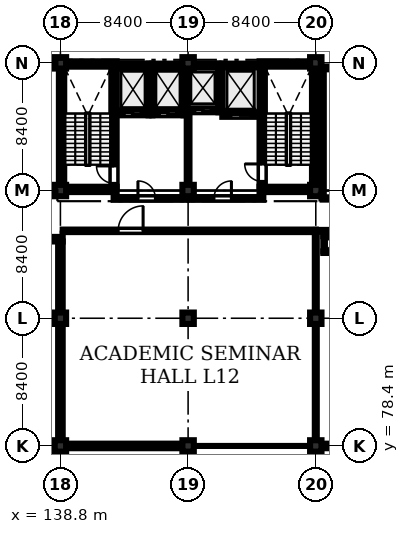
"""IFC4 building model, lengths in metres.
Left out: names, types, materials, properties, quantities, classifications, styles, units other than length and angle.
Written with IfcOpenShell. Run it as: python <this file> out.ifc"""

import sys

from ifc_helpers import new_model, si_unit, direction, frame, frame_2d, origin, origin_2d, place, context, subcontext, project, spatial, rectangle, extrude, element, fill, save


model = new_model("IFC4")
c1 = context("Model", 3, precision=1e-05, world=origin(), true_north=direction((0.0, 1.0)))
c2 = subcontext(c1, "Body", "Model", "MODEL_VIEW")
j1 = project(units=[si_unit("LENGTHUNIT", "METRE"), si_unit("PLANEANGLEUNIT", "RADIAN")], contexts=[c1])
p1 = place(None, origin())
s1 = spatial("IfcSite", under=j1, at=p1, CompositionType="ELEMENT")
p2 = place(p1, origin())
s2 = spatial("IfcBuilding", under=s1, at=p2, CompositionType="ELEMENT")
p3 = place(p2, frame((0.0, 0.0, 48.6)))
s3 = spatial("IfcBuildingStorey", under=s2, at=p3, CompositionType="ELEMENT", Elevation=48.6)
for number, where, z_axis, x_axis in (
    (1, (138.8, 78.4, 0.0), (0.0, 0.0, 1.0), (1.0, 0.0, 0.0)),
    (2, (138.8, 86.8, 0.0), (0.0, 0.0, 1.0), (1.0, 0.0, 0.0)),
    (3, (138.8, 95.2, 0.0), (0.0, 0.0, 1.0), (1.0, 0.0, 0.0)),
    (4, (138.8, 103.6, 0.0), (0.0, 0.0, 1.0), (1.0, 0.0, 0.0)),
    (5, (147.2, 78.4, 0.0), (0.0, 0.0, 1.0), (1.0, 0.0, 0.0)),
    (6, (147.2, 86.8, 0.0), (0.0, 0.0, 1.0), (1.0, 0.0, 0.0)),
    (7, (147.2, 95.2, 0.0), (0.0, 0.0, 1.0), (1.0, 0.0, 0.0)),
    (8, (147.2, 103.6, 0.0), (0.0, 0.0, 1.0), (1.0, 0.0, 0.0)),
    (9, (155.6, 78.4, 0.0), (0.0, 0.0, 1.0), (1.0, 0.0, 0.0)),
    (10, (155.6, 86.8, 0.0), (0.0, 0.0, 1.0), (1.0, 0.0, 0.0)),
    (11, (155.6, 95.2, 0.0), (0.0, 0.0, 1.0), (1.0, 0.0, 0.0)),
    (12, (155.6, 103.6, 0.0), (0.0, 0.0, 1.0), (1.0, 0.0, 0.0)),
):
    element("IfcColumn", number, at=place(p3, frame(where, z_axis=z_axis, x_axis=x_axis)), inside=s3, PredefinedType="COLUMN", context=c2, shape_type="SweptSolid", body=[
        extrude(rectangle(XDim=0.75, YDim=0.75, at=origin_2d()), origin(), (0.0, 0.0, 1.0), 4.03),
    ])
for number, where, z_axis, x_axis in (
    (13, (138.7, 95.275, 0.0), (0.0, 0.0, 1.0), (1.0, 0.0, 0.0)),
    (14, (138.7, 103.525, 0.0), (0.0, 0.0, 1.0), (1.0, 0.0, 0.0)),
):
    element("IfcWall", number, at=place(p3, frame(where, z_axis=z_axis, x_axis=x_axis)), inside=s3, PredefinedType="SHEAR", context=c2, shape_type="SweptSolid", body=[
        extrude(rectangle(XDim=3.8, YDim=0.35, at=frame_2d((1.9, 0.0))), origin(), (0.0, 0.0, 1.0), 4.03),
    ])
p4 = place(p3, frame((138.875, 95.45, 0.0), z_axis=(0.0, 0.0, 1.0), x_axis=(0.0, 1.0, 0.0)))
e15 = element("IfcWall", 15, at=p4, inside=s3, PredefinedType="SHEAR", context=c2, shape_type="SweptSolid", body=[
    extrude(rectangle(XDim=7.9, YDim=0.35, at=frame_2d((3.95, 0.0))), origin(), (0.0, 0.0, 1.0), 4.03),
])
p5 = place(p3, frame((142.325, 95.45, 0.0), z_axis=(0.0, 0.0, 1.0), x_axis=(0.0, 1.0, 0.0)))
e16 = element("IfcWall", 16, at=p5, inside=s3, PredefinedType="SHEAR", context=c2, shape_type="SweptSolid", body=[
    extrude(rectangle(XDim=7.9, YDim=0.35, at=frame_2d((3.95, 0.0))), origin(), (0.0, 0.0, 1.0), 4.03),
])
p6 = place(p5, frame((0.22, 0.0, 0.0)))
e17 = element("IfcOpeningElement", 17, at=p6, cuts=e16, PredefinedType="OPENING", context=c2, shape_type="SweptSolid", body=[
    extrude(rectangle(XDim=1.15, YDim=2.15, at=frame_2d((0.575, 1.075))), frame((0.0, 0.185, 0.0), z_axis=(0.0, -1.0, 0.0), x_axis=(1.0, 0.0, 0.0)), (0.0, 0.0, 1.0), 0.37),
])
for number, where, z_axis, x_axis in (
    (18, (151.9, 95.275, 0.0), (0.0, 0.0, 1.0), (1.0, 0.0, 0.0)),
    (19, (151.9, 103.525, 0.0), (0.0, 0.0, 1.0), (1.0, 0.0, 0.0)),
):
    element("IfcWall", number, at=place(p3, frame(where, z_axis=z_axis, x_axis=x_axis)), inside=s3, PredefinedType="SHEAR", context=c2, shape_type="SweptSolid", body=[
        extrude(rectangle(XDim=3.8, YDim=0.35, at=frame_2d((1.9, 0.0))), origin(), (0.0, 0.0, 1.0), 4.03),
    ])
p7 = place(p3, frame((152.075, 95.45, 0.0), z_axis=(0.0, 0.0, 1.0), x_axis=(0.0, 1.0, 0.0)))
e20 = element("IfcWall", 20, at=p7, inside=s3, PredefinedType="SHEAR", context=c2, shape_type="SweptSolid", body=[
    extrude(rectangle(XDim=7.9, YDim=0.35, at=frame_2d((3.95, 0.0))), origin(), (0.0, 0.0, 1.0), 4.03),
])
p8 = place(p7, frame((0.35, 0.0, 0.0)))
e21 = element("IfcOpeningElement", 21, at=p8, cuts=e20, PredefinedType="OPENING", context=c2, shape_type="SweptSolid", body=[
    extrude(rectangle(XDim=1.15, YDim=2.15, at=frame_2d((0.575, 1.075))), frame((0.0, 0.185, 0.0), z_axis=(0.0, -1.0, 0.0), x_axis=(1.0, 0.0, 0.0)), (0.0, 0.0, 1.0), 0.37),
])
p9 = place(p3, frame((155.525, 95.45, 0.0), z_axis=(0.0, 0.0, 1.0), x_axis=(0.0, 1.0, 0.0)))
e22 = element("IfcWall", 22, at=p9, inside=s3, PredefinedType="SHEAR", context=c2, shape_type="SweptSolid", body=[
    extrude(rectangle(XDim=7.9, YDim=0.35, at=frame_2d((3.95, 0.0))), origin(), (0.0, 0.0, 1.0), 4.03),
])
p10 = place(p3, frame((142.5, 100.275, 0.0), z_axis=(0.0, 0.0, 1.0), x_axis=(1.0, 0.0, 0.0)))
e23 = element("IfcWall", 23, at=p10, inside=s3, PredefinedType="SHEAR", context=c2, shape_type="SweptSolid", body=[
    extrude(rectangle(XDim=2.1, YDim=0.25, at=frame_2d((1.05, 0.0))), origin(), (0.0, 0.0, 1.0), 4.03),
])
p11 = place(p10, frame((0.5, 0.0, 0.0)))
e24 = element("IfcOpeningElement", 24, at=p11, cuts=e23, PredefinedType="OPENING", context=c2, shape_type="SweptSolid", body=[
    extrude(rectangle(XDim=1.1, YDim=2.15, at=frame_2d((0.55, 1.075))), frame((0.0, 0.135, 0.0), z_axis=(0.0, -1.0, 0.0), x_axis=(1.0, 0.0, 0.0)), (0.0, 0.0, 1.0), 0.27),
])
p12 = place(p3, frame((142.5, 103.425, 0.0), z_axis=(0.0, 0.0, 1.0), x_axis=(1.0, 0.0, 0.0)))
e25 = element("IfcWall", 25, at=p12, inside=s3, PredefinedType="SHEAR", context=c2, shape_type="SweptSolid", body=[
    extrude(rectangle(XDim=2.1, YDim=0.25, at=frame_2d((1.05, 0.0))), origin(), (0.0, 0.0, 1.0), 4.03),
])
p13 = place(p3, frame((144.725, 100.15, 0.0), z_axis=(0.0, 0.0, 1.0), x_axis=(0.0, 1.0, 0.0)))
e26 = element("IfcWall", 26, at=p13, inside=s3, PredefinedType="SHEAR", context=c2, shape_type="SweptSolid", body=[
    extrude(rectangle(XDim=3.4, YDim=0.25, at=frame_2d((1.7, 0.0))), origin(), (0.0, 0.0, 1.0), 4.03),
])
p14 = place(p3, frame((144.85, 100.275, 0.0), z_axis=(0.0, 0.0, 1.0), x_axis=(1.0, 0.0, 0.0)))
e27 = element("IfcWall", 27, at=p14, inside=s3, PredefinedType="SHEAR", context=c2, shape_type="SweptSolid", body=[
    extrude(rectangle(XDim=2.05, YDim=0.25, at=frame_2d((1.025, 0.0))), origin(), (0.0, 0.0, 1.0), 4.03),
])
p15 = place(p14, frame((0.465, 0.0, 0.0)))
e28 = element("IfcOpeningElement", 28, at=p15, cuts=e27, PredefinedType="OPENING", context=c2, shape_type="SweptSolid", body=[
    extrude(rectangle(XDim=1.12, YDim=2.15, at=frame_2d((0.56, 1.075))), frame((0.0, 0.135, 0.0), z_axis=(0.0, -1.0, 0.0), x_axis=(1.0, 0.0, 0.0)), (0.0, 0.0, 1.0), 0.27),
])
p16 = place(p3, frame((144.85, 103.425, 0.0), z_axis=(0.0, 0.0, 1.0), x_axis=(1.0, 0.0, 0.0)))
e29 = element("IfcWall", 29, at=p16, inside=s3, PredefinedType="SHEAR", context=c2, shape_type="SweptSolid", body=[
    extrude(rectangle(XDim=2.05, YDim=0.25, at=frame_2d((1.025, 0.0))), origin(), (0.0, 0.0, 1.0), 4.03),
])
p17 = place(p3, frame((147.025, 100.15, 0.0), z_axis=(0.0, 0.0, 1.0), x_axis=(0.0, 1.0, 0.0)))
e30 = element("IfcWall", 30, at=p17, inside=s3, PredefinedType="SHEAR", context=c2, shape_type="SweptSolid", body=[
    extrude(rectangle(XDim=3.4, YDim=0.25, at=frame_2d((1.7, 0.0))), origin(), (0.0, 0.0, 1.0), 4.03),
])
p18 = place(p3, frame((147.15, 100.475, 0.0), z_axis=(0.0, 0.0, 1.0), x_axis=(1.0, 0.0, 0.0)))
e31 = element("IfcWall", 31, at=p18, inside=s3, PredefinedType="SHEAR", context=c2, shape_type="SweptSolid", body=[
    extrude(rectangle(XDim=2.05, YDim=0.25, at=frame_2d((1.025, 0.0))), origin(), (0.0, 0.0, 1.0), 4.03),
])
p19 = place(p18, frame((0.495, 0.0, 0.0)))
e32 = element("IfcOpeningElement", 32, at=p19, cuts=e31, PredefinedType="OPENING", context=c2, shape_type="SweptSolid", body=[
    extrude(rectangle(XDim=1.06, YDim=2.15, at=frame_2d((0.53, 1.075))), frame((0.0, 0.135, 0.0), z_axis=(0.0, -1.0, 0.0), x_axis=(1.0, 0.0, 0.0)), (0.0, 0.0, 1.0), 0.27),
])
p20 = place(p3, frame((147.15, 103.425, 0.0), z_axis=(0.0, 0.0, 1.0), x_axis=(1.0, 0.0, 0.0)))
e33 = element("IfcWall", 33, at=p20, inside=s3, PredefinedType="SHEAR", context=c2, shape_type="SweptSolid", body=[
    extrude(rectangle(XDim=2.05, YDim=0.25, at=frame_2d((1.025, 0.0))), origin(), (0.0, 0.0, 1.0), 4.03),
])
p21 = place(p3, frame((149.325, 100.35, 0.0), z_axis=(0.0, 0.0, 1.0), x_axis=(0.0, 1.0, 0.0)))
e34 = element("IfcWall", 34, at=p21, inside=s3, PredefinedType="SHEAR", context=c2, shape_type="SweptSolid", body=[
    extrude(rectangle(XDim=3.2, YDim=0.25, at=frame_2d((1.6, 0.0))), origin(), (0.0, 0.0, 1.0), 4.03),
])
p22 = place(p3, frame((149.45, 100.175, 0.0), z_axis=(0.0, 0.0, 1.0), x_axis=(1.0, 0.0, 0.0)))
e35 = element("IfcWall", 35, at=p22, inside=s3, PredefinedType="SHEAR", context=c2, shape_type="SweptSolid", body=[
    extrude(rectangle(XDim=2.45, YDim=0.25, at=frame_2d((1.225, 0.0))), origin(), (0.0, 0.0, 1.0), 4.03),
])
p23 = place(p22, frame((0.575, 0.0, 0.0)))
e36 = element("IfcOpeningElement", 36, at=p23, cuts=e35, PredefinedType="OPENING", context=c2, shape_type="SweptSolid", body=[
    extrude(rectangle(XDim=1.3, YDim=2.25, at=frame_2d((0.65, 1.125))), frame((0.0, 0.135, 0.0), z_axis=(0.0, -1.0, 0.0), x_axis=(1.0, 0.0, 0.0)), (0.0, 0.0, 1.0), 0.27),
])
p24 = place(p3, frame((149.45, 103.425, 0.0), z_axis=(0.0, 0.0, 1.0), x_axis=(1.0, 0.0, 0.0)))
e37 = element("IfcWall", 37, at=p24, inside=s3, PredefinedType="SHEAR", context=c2, shape_type="SweptSolid", body=[
    extrude(rectangle(XDim=2.45, YDim=0.25, at=frame_2d((1.225, 0.0))), origin(), (0.0, 0.0, 1.0), 4.03),
])
p25 = place(p3, frame((146.825, 78.4, 0.0), z_axis=(0.0, 0.0, 1.0), x_axis=(-1.0, 0.0, 0.0)))
e38 = element("IfcWall", 38, at=p25, inside=s3, PredefinedType="STANDARD", context=c2, shape_type="SweptSolid", body=[
    extrude(rectangle(XDim=7.65, YDim=0.3, at=frame_2d((3.825, 0.0))), origin(), (0.0, 0.0, 1.0), 3.33),
])
p26 = place(p25, frame((1.15, 0.0, 0.95)))
e39 = element("IfcOpeningElement", 39, at=p26, cuts=e38, PredefinedType="OPENING", context=c2, shape_type="SweptSolid", body=[
    extrude(rectangle(XDim=2.2, YDim=2.0, at=frame_2d((1.1, 1.0))), frame((0.0, 0.16, 0.0), z_axis=(0.0, -1.0, 0.0), x_axis=(1.0, 0.0, 0.0)), (0.0, 0.0, 1.0), 0.32),
])
p27 = place(p3, frame((163.075, 78.4, 0.0), z_axis=(0.0, 0.0, 1.0), x_axis=(-1.0, 0.0, 0.0)))
e40 = element("IfcWall", 40, at=p27, inside=s3, PredefinedType="STANDARD", context=c2, shape_type="SweptSolid", body=[
    extrude(rectangle(XDim=7.1, YDim=0.3, at=frame_2d((3.55, 0.0))), origin(), (0.0, 0.0, 1.0), 3.33),
])
p28 = place(p27, frame((1.15, 0.0, 0.95)))
e41 = element("IfcOpeningElement", 41, at=p28, cuts=e40, PredefinedType="OPENING", context=c2, shape_type="SweptSolid", body=[
    extrude(rectangle(XDim=2.2, YDim=2.0, at=frame_2d((1.1, 1.0))), frame((0.0, 0.16, 0.0), z_axis=(0.0, -1.0, 0.0), x_axis=(1.0, 0.0, 0.0)), (0.0, 0.0, 1.0), 0.32),
])
p29 = place(p3, frame((138.8, 78.775, 0.0), z_axis=(0.0, 0.0, 1.0), x_axis=(0.0, 1.0, 0.0)))
e42 = element("IfcWall", 42, at=p29, inside=s3, PredefinedType="STANDARD", context=c2, shape_type="SweptSolid", body=[
    extrude(rectangle(XDim=7.65, YDim=0.3, at=frame_2d((3.825, 0.0))), origin(), (0.0, 0.0, 1.0), 3.33),
])
p30 = place(p29, frame((2.4, 0.0, 0.95)))
e43 = element("IfcOpeningElement", 43, at=p30, cuts=e42, PredefinedType="OPENING", context=c2, shape_type="SweptSolid", body=[
    extrude(rectangle(XDim=1.5, YDim=1.8, at=frame_2d((0.75, 0.9))), frame((0.0, 0.16, 0.0), z_axis=(0.0, -1.0, 0.0), x_axis=(1.0, 0.0, 0.0)), (0.0, 0.0, 1.0), 0.32),
])
p31 = place(p3, frame((138.8, 87.175, 0.0), z_axis=(0.0, 0.0, 1.0), x_axis=(0.0, 1.0, 0.0)))
e44 = element("IfcWall", 44, at=p31, inside=s3, PredefinedType="STANDARD", context=c2, shape_type="SweptSolid", body=[
    extrude(rectangle(XDim=4.675, YDim=0.3, at=frame_2d((2.337, 0.0))), origin(), (0.0, 0.0, 1.0), 3.33),
])
p32 = place(p31, frame((2.4, 0.0, 0.95)))
e45 = element("IfcOpeningElement", 45, at=p32, cuts=e44, PredefinedType="OPENING", context=c2, shape_type="SweptSolid", body=[
    extrude(rectangle(XDim=1.5, YDim=1.8, at=frame_2d((0.75, 0.9))), frame((0.0, 0.16, 0.0), z_axis=(0.0, -1.0, 0.0), x_axis=(1.0, 0.0, 0.0)), (0.0, 0.0, 1.0), 0.32),
])
p33 = place(p3, frame((138.95, 92.0, 0.0), z_axis=(0.0, 0.0, 1.0), x_axis=(-1.0, 0.0, 0.0)))
e46 = element("IfcWall", 46, at=p33, inside=s3, PredefinedType="STANDARD", context=c2, shape_type="SweptSolid", body=[
    extrude(rectangle(XDim=8.7, YDim=0.3, at=frame_2d((4.35, 0.0))), origin(), (0.0, 0.0, 1.0), 4.03),
])
p34 = place(p3, frame((142.3, 94.68, 0.0), z_axis=(0.0, 0.0, 1.0), x_axis=(1.0, 0.0, 0.0)))
e47 = element("IfcWall", 47, at=p34, inside=s3, PredefinedType="STANDARD", context=c2, shape_type="SweptSolid", body=[
    extrude(rectangle(XDim=4.8, YDim=0.18, at=frame_2d((2.4, 0.0))), origin(), (0.0, 0.0, 1.0), 4.03),
])
p35 = place(p34, frame((1.6, 0.0, 0.0)))
e48 = element("IfcOpeningElement", 48, at=p35, cuts=e47, PredefinedType="OPENING", context=c2, shape_type="SweptSolid", body=[
    extrude(rectangle(XDim=1.15, YDim=2.15, at=frame_2d((0.575, 1.075))), frame((0.0, 0.1, 0.0), z_axis=(0.0, -1.0, 0.0), x_axis=(1.0, 0.0, 0.0)), (0.0, 0.0, 1.0), 0.2),
])
p36 = place(p3, frame((147.3, 94.68, 0.0), z_axis=(0.0, 0.0, 1.0), x_axis=(1.0, 0.0, 0.0)))
e49 = element("IfcWall", 49, at=p36, inside=s3, PredefinedType="STANDARD", context=c2, shape_type="SweptSolid", body=[
    extrude(rectangle(XDim=4.85, YDim=0.18, at=frame_2d((2.425, 0.0))), origin(), (0.0, 0.0, 1.0), 4.03),
])
p37 = place(p36, frame((1.6, 0.0, 0.0)))
e50 = element("IfcOpeningElement", 50, at=p37, cuts=e49, PredefinedType="OPENING", context=c2, shape_type="SweptSolid", body=[
    extrude(rectangle(XDim=1.15, YDim=2.15, at=frame_2d((0.575, 1.075))), frame((0.0, 0.1, 0.0), z_axis=(0.0, -1.0, 0.0), x_axis=(1.0, 0.0, 0.0)), (0.0, 0.0, 1.0), 0.2),
])
p38 = place(p3, frame((147.2, 95.75, 0.0), z_axis=(0.0, 0.0, 1.0), x_axis=(0.0, 1.0, 0.0)))
e51 = element("IfcWall", 51, at=p38, inside=s3, PredefinedType="STANDARD", context=c2, shape_type="SweptSolid", body=[
    extrude(rectangle(XDim=4.5, YDim=0.18, at=frame_2d((2.25, 0.0))), origin(), (0.0, 0.0, 1.0), 3.33),
])
p39 = place(p3, frame((156.05, 94.68, 0.0), z_axis=(0.0, 0.0, 1.0), x_axis=(1.0, 0.0, 0.0)))
e52 = element("IfcWall", 52, at=p39, inside=s3, PredefinedType="PARTITIONING", context=c2, shape_type="SweptSolid", body=[
    extrude(rectangle(XDim=7.15, YDim=0.15, at=frame_2d((3.575, 0.0))), origin(), (0.0, 0.0, 1.0), 4.03),
])
p40 = place(p39, frame((0.55, 0.0, 0.0)))
e53 = element("IfcOpeningElement", 53, at=p40, cuts=e52, PredefinedType="OPENING", context=c2, shape_type="SweptSolid", body=[
    extrude(rectangle(XDim=0.98, YDim=2.12, at=frame_2d((0.49, 1.06))), frame((0.0, 0.085, 0.0), z_axis=(0.0, -1.0, 0.0), x_axis=(1.0, 0.0, 0.0)), (0.0, 0.0, 1.0), 0.17),
])
p41 = place(p3, frame((156.05, 103.25, 0.0), z_axis=(0.0, 0.0, 1.0), x_axis=(1.0, 0.0, 0.0)))
e54 = element("IfcWall", 54, at=p41, inside=s3, PredefinedType="PARTITIONING", context=c2, shape_type="SweptSolid", body=[
    extrude(rectangle(XDim=7.15, YDim=0.15, at=frame_2d((3.575, 0.0))), origin(), (0.0, 0.0, 1.0), 4.03),
])
p42 = place(p3, frame((156.05, 94.68, 0.0), z_axis=(0.0, 0.0, 1.0), x_axis=(0.0, 1.0, 0.0)))
e55 = element("IfcWall", 55, at=p42, inside=s3, PredefinedType="PARTITIONING", context=c2, shape_type="SweptSolid", body=[
    extrude(rectangle(XDim=8.57, YDim=0.15, at=frame_2d((4.285, 0.0))), origin(), (0.0, 0.0, 1.0), 4.03),
])
p43 = place(p3, frame((138.95, 92.55, 0.0), z_axis=(0.0, 0.0, 1.0), x_axis=(1.0, 0.0, 0.0)))
e56 = element("IfcWall", 56, at=p43, inside=s3, PredefinedType="PARTITIONING", context=c2, shape_type="SweptSolid", body=[
    extrude(rectangle(XDim=16.65, YDim=0.165, at=frame_2d((8.325, 0.0))), origin(), (0.0, 0.0, 1.0), 4.03),
])
p44 = place(p43, frame((3.65, 0.0, 0.0)))
e57 = element("IfcOpeningElement", 57, at=p44, cuts=e56, PredefinedType="OPENING", context=c2, shape_type="SweptSolid", body=[
    extrude(rectangle(XDim=1.64, YDim=2.24, at=frame_2d((0.82, 1.12))), frame((0.0, 0.093, 0.0), z_axis=(0.0, -1.0, 0.0), x_axis=(1.0, 0.0, 0.0)), (0.0, 0.0, 1.0), 0.185),
])
p45 = place(p3, frame((155.6, 92.55, 0.0), z_axis=(0.0, 0.0, 1.0), x_axis=(1.0, 0.0, 0.0)))
e58 = element("IfcWall", 58, at=p45, inside=s3, PredefinedType="PARTITIONING", context=c2, shape_type="SweptSolid", body=[
    extrude(rectangle(XDim=7.75, YDim=0.12, at=frame_2d((3.875, 0.0))), origin(), (0.0, 0.0, 1.0), 4.03),
])
p46 = place(p45, frame((3.4, 0.0, 0.0)))
e59 = element("IfcOpeningElement", 59, at=p46, cuts=e58, PredefinedType="OPENING", context=c2, shape_type="SweptSolid", body=[
    extrude(rectangle(XDim=1.08, YDim=2.15, at=frame_2d((0.54, 1.075))), frame((0.0, 0.07, 0.0), z_axis=(0.0, -1.0, 0.0), x_axis=(1.0, 0.0, 0.0)), (0.0, 0.0, 1.0), 0.14),
])
p47 = place(p3, frame((155.6, 78.55, 0.0), z_axis=(0.0, 0.0, 1.0), x_axis=(0.0, 1.0, 0.0)))
e60 = element("IfcWall", 60, at=p47, inside=s3, PredefinedType="PARTITIONING", context=c2, shape_type="SweptSolid", body=[
    extrude(rectangle(XDim=14.0, YDim=0.128, at=frame_2d((7.0, 0.0))), origin(), (0.0, 0.0, 1.0), 3.33),
])
for number, where, z_axis, x_axis in (
    (61, (156.095, 91.147, 0.0), (0.0, 0.0, 1.0), (1.0, 0.0, 0.0)),
    (62, (156.095, 92.252, 0.0), (0.0, 0.0, 1.0), (1.0, 0.0, 0.0)),
):
    element("IfcWall", number, at=place(p3, frame(where, z_axis=z_axis, x_axis=x_axis)), inside=s3, PredefinedType="PARTITIONING", context=c2, shape_type="SweptSolid", body=[
        extrude(rectangle(XDim=1.31, YDim=0.105, at=frame_2d((0.655, 0.0))), origin(), (0.0, 0.0, 1.0), 4.03),
    ])
p48 = place(p3, frame((156.147, 91.2, 0.0), z_axis=(0.0, 0.0, 1.0), x_axis=(0.0, 1.0, 0.0)))
e63 = element("IfcWall", 63, at=p48, inside=s3, PredefinedType="PARTITIONING", context=c2, shape_type="SweptSolid", body=[
    extrude(rectangle(XDim=1.0, YDim=0.105, at=frame_2d((0.5, 0.0))), origin(), (0.0, 0.0, 1.0), 4.03),
])
p49 = place(p26, origin())
e64 = element("IfcWindow", 64, at=p49, inside=s3, PartitioningType="DOUBLE_PANEL_VERTICAL", PredefinedType="WINDOW", context=c2, shape_type="SweptSolid", body=[
    extrude(rectangle(XDim=2.2, YDim=2.0, at=frame_2d((1.1, 1.0))), frame((0.0, 0.03, 0.0), z_axis=(0.0, -1.0, 0.0), x_axis=(1.0, 0.0, 0.0)), (0.0, 0.0, 1.0), 0.06),
])
fill(e39, e64)
p50 = place(p30, origin())
e65 = element("IfcWindow", 65, at=p50, inside=s3, PartitioningType="DOUBLE_PANEL_VERTICAL", PredefinedType="WINDOW", context=c2, shape_type="SweptSolid", body=[
    extrude(rectangle(XDim=1.5, YDim=1.8, at=frame_2d((0.75, 0.9))), frame((0.0, 0.03, 0.0), z_axis=(0.0, -1.0, 0.0), x_axis=(1.0, 0.0, 0.0)), (0.0, 0.0, 1.0), 0.06),
])
fill(e43, e65)
p51 = place(p32, origin())
e66 = element("IfcWindow", 66, at=p51, inside=s3, PartitioningType="DOUBLE_PANEL_VERTICAL", PredefinedType="WINDOW", context=c2, shape_type="SweptSolid", body=[
    extrude(rectangle(XDim=1.5, YDim=1.8, at=frame_2d((0.75, 0.9))), frame((0.0, 0.03, 0.0), z_axis=(0.0, -1.0, 0.0), x_axis=(1.0, 0.0, 0.0)), (0.0, 0.0, 1.0), 0.06),
])
fill(e45, e66)
p52 = place(p35, origin())
e67 = element("IfcDoor", 67, at=p52, inside=s3, OperationType="SINGLE_SWING_LEFT", PredefinedType="DOOR", context=c2, shape_type="SweptSolid", body=[
    extrude(rectangle(XDim=1.15, YDim=2.15, at=frame_2d((0.575, 1.075))), frame((0.0, 0.025, 0.0), z_axis=(0.0, -1.0, 0.0), x_axis=(1.0, 0.0, 0.0)), (0.0, 0.0, 1.0), 0.05),
])
fill(e48, e67)
p53 = place(p37, origin())
e68 = element("IfcDoor", 68, at=p53, inside=s3, OperationType="SINGLE_SWING_RIGHT", PredefinedType="DOOR", context=c2, shape_type="SweptSolid", body=[
    extrude(rectangle(XDim=1.15, YDim=2.15, at=frame_2d((0.575, 1.075))), frame((0.0, 0.025, 0.0), z_axis=(0.0, -1.0, 0.0), x_axis=(1.0, 0.0, 0.0)), (0.0, 0.0, 1.0), 0.05),
])
fill(e50, e68)
p54 = place(p44, origin())
e69 = element("IfcDoor", 69, at=p54, inside=s3, OperationType="SINGLE_SWING_RIGHT", PredefinedType="DOOR", context=c2, shape_type="SweptSolid", body=[
    extrude(rectangle(XDim=1.64, YDim=2.24, at=frame_2d((0.82, 1.12))), frame((0.0, 0.025, 0.0), z_axis=(0.0, -1.0, 0.0), x_axis=(1.0, 0.0, 0.0)), (0.0, 0.0, 1.0), 0.05),
])
fill(e57, e69)
p55 = place(p6, origin())
e70 = element("IfcDoor", 70, at=p55, inside=s3, OperationType="SINGLE_SWING_RIGHT", PredefinedType="DOOR", context=c2, shape_type="SweptSolid", body=[
    extrude(rectangle(XDim=1.15, YDim=2.15, at=frame_2d((0.575, 1.075))), frame((0.0, 0.025, 0.0), z_axis=(0.0, -1.0, 0.0), x_axis=(1.0, 0.0, 0.0)), (0.0, 0.0, 1.0), 0.05),
])
fill(e17, e70)
p56 = place(p8, origin())
e71 = element("IfcDoor", 71, at=p56, inside=s3, OperationType="SINGLE_SWING_RIGHT", PredefinedType="DOOR", context=c2, shape_type="SweptSolid", body=[
    extrude(rectangle(XDim=1.15, YDim=2.15, at=frame_2d((0.575, 1.075))), frame((0.0, 0.025, 0.0), z_axis=(0.0, -1.0, 0.0), x_axis=(1.0, 0.0, 0.0)), (0.0, 0.0, 1.0), 0.05),
])
fill(e21, e71)
p57 = place(p11, origin())
e72 = element("IfcDoor", 72, at=p57, inside=s3, OperationType="SLIDING_TO_LEFT", PredefinedType="DOOR", context=c2, shape_type="SweptSolid", body=[
    extrude(rectangle(XDim=1.1, YDim=2.15, at=frame_2d((0.55, 1.075))), frame((0.0, 0.025, 0.0), z_axis=(0.0, -1.0, 0.0), x_axis=(1.0, 0.0, 0.0)), (0.0, 0.0, 1.0), 0.05),
])
fill(e24, e72)
p58 = place(p15, origin())
e73 = element("IfcDoor", 73, at=p58, inside=s3, OperationType="SLIDING_TO_LEFT", PredefinedType="DOOR", context=c2, shape_type="SweptSolid", body=[
    extrude(rectangle(XDim=1.12, YDim=2.15, at=frame_2d((0.56, 1.075))), frame((0.0, 0.025, 0.0), z_axis=(0.0, -1.0, 0.0), x_axis=(1.0, 0.0, 0.0)), (0.0, 0.0, 1.0), 0.05),
])
fill(e28, e73)
p59 = place(p19, origin())
e74 = element("IfcDoor", 74, at=p59, inside=s3, OperationType="SLIDING_TO_LEFT", PredefinedType="DOOR", context=c2, shape_type="SweptSolid", body=[
    extrude(rectangle(XDim=1.06, YDim=2.15, at=frame_2d((0.53, 1.075))), frame((0.0, 0.025, 0.0), z_axis=(0.0, -1.0, 0.0), x_axis=(1.0, 0.0, 0.0)), (0.0, 0.0, 1.0), 0.05),
])
fill(e32, e74)
p60 = place(p23, origin())
e75 = element("IfcDoor", 75, at=p60, inside=s3, OperationType="SLIDING_TO_LEFT", PredefinedType="DOOR", context=c2, shape_type="SweptSolid", body=[
    extrude(rectangle(XDim=1.3, YDim=2.25, at=frame_2d((0.65, 1.125))), frame((0.0, 0.025, 0.0), z_axis=(0.0, -1.0, 0.0), x_axis=(1.0, 0.0, 0.0)), (0.0, 0.0, 1.0), 0.05),
])
fill(e36, e75)
save(model, sys.argv[1])
